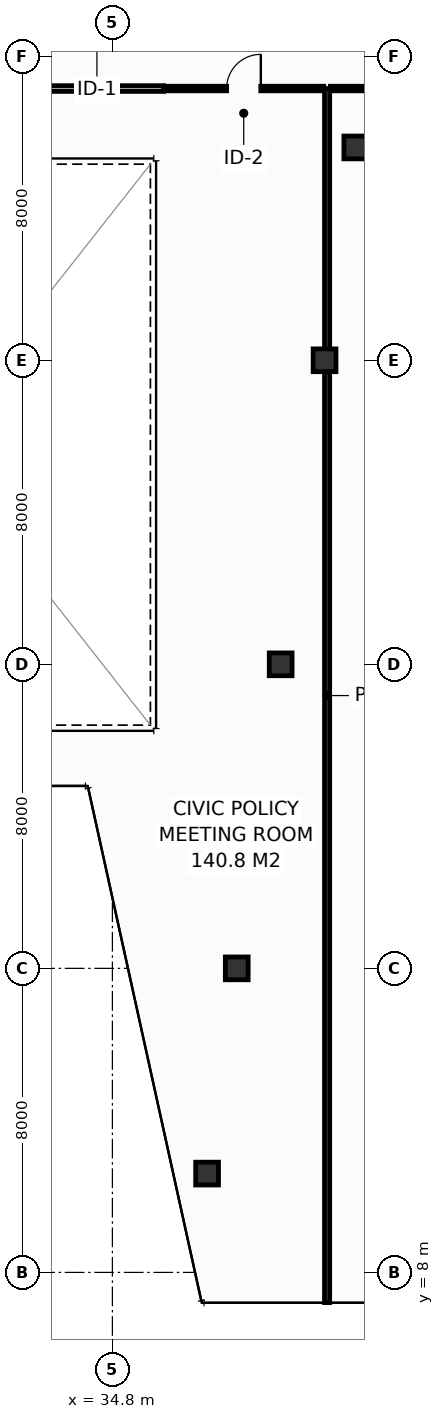
"""IFC4 building model, lengths in metres.
Left out: names, types, materials, properties, quantities, classifications, styles, units other than length and angle.
Written with IfcOpenShell. Run it as: python <this file> out.ifc"""

import sys

from ifc_helpers import new_model, si_unit, direction, frame, frame_2d, origin, origin_2d, place, context, subcontext, project, spatial, rectangle, hollow_rectangle, extrude, element, fill, save


model = new_model("IFC4")
c1 = context("Model", 3, precision=1e-05, world=origin(), true_north=direction((0.0, 1.0)))
c2 = subcontext(c1, "Body", "Model", "MODEL_VIEW")
j1 = project(units=[si_unit("LENGTHUNIT", "METRE"), si_unit("PLANEANGLEUNIT", "RADIAN")], contexts=[c1])
p1 = place(None, origin())
s1 = spatial("IfcSite", under=j1, at=p1, CompositionType="ELEMENT")
p2 = place(p1, origin())
s2 = spatial("IfcBuilding", under=s1, at=p2, CompositionType="ELEMENT")
p3 = place(p2, frame((0.0, 0.0, 144.8)))
s3 = spatial("IfcBuildingStorey", under=s2, at=p3, CompositionType="ELEMENT", Elevation=144.8)
for number, where, z_axis, x_axis in (
    (1, (37.292, 10.6, 0.0), (0.0, 0.0, 1.0), (1.0, 0.0, 0.0)),
    (2, (38.072, 16.0, 0.0), (0.0, 0.0, 1.0), (1.0, 0.0, 0.0)),
    (3, (39.228, 24.0, 0.0), (0.0, 0.0, 1.0), (1.0, 0.0, 0.0)),
    (4, (40.383, 32.0, 0.0), (0.0, 0.0, 1.0), (1.0, 0.0, 0.0)),
    (5, (41.192, 37.6, 0.0), (0.0, 0.0, 1.0), (1.0, 0.0, 0.0)),
):
    element("IfcColumn", number, at=place(p3, frame(where, z_axis=z_axis, x_axis=x_axis)), inside=s3, PredefinedType="COLUMN", context=c2, shape_type="SweptSolid", body=[
        extrude(hollow_rectangle(XDim=0.6, YDim=0.6, WallThickness=0.028, at=origin_2d()), origin(), (0.0, 0.0, 1.0), 3.8),
    ])
p4 = place(p3, frame((40.45, 7.205, 0.0), z_axis=(0.0, 0.0, 1.0), x_axis=(0.0, 1.0, 0.0)))
e6 = element("IfcWall", 6, at=p4, inside=s3, PredefinedType="PARTITIONING", context=c2, shape_type="SweptSolid", body=[
    extrude(rectangle(XDim=31.945, YDim=0.135, at=frame_2d((15.972, 0.0))), origin(), (0.0, 0.0, 1.0), 2.835),
])
p5 = place(p3, frame((23.85, 39.15, 0.0), z_axis=(0.0, 0.0, 1.0), x_axis=(1.0, 0.0, 0.0)))
e7 = element("IfcWall", 7, at=p5, inside=s3, PredefinedType="PARTITIONING", context=c2, shape_type="SweptSolid", body=[
    extrude(rectangle(XDim=12.3, YDim=0.15, at=frame_2d((6.15, 0.0))), origin(), (0.0, 0.0, 1.0), 3.55),
])
p6 = place(p3, frame((36.15, 39.15, 0.0), z_axis=(0.0, 0.0, 1.0), x_axis=(1.0, 0.0, 0.0)))
e8 = element("IfcWall", 8, at=p6, inside=s3, PredefinedType="PARTITIONING", context=c2, shape_type="SweptSolid", body=[
    extrude(rectangle(XDim=4.213, YDim=0.12, at=frame_2d((2.106, 0.0))), origin(), (0.0, 0.0, 1.0), 2.835),
])
p7 = place(p6, frame((1.656, 0.0, 0.0)))
e9 = element("IfcOpeningElement", 9, at=p7, cuts=e8, PredefinedType="OPENING", context=c2, shape_type="SweptSolid", body=[
    extrude(rectangle(XDim=0.9, YDim=2.1, at=frame_2d((0.45, 1.05))), frame((0.0, 0.07, 0.0), z_axis=(0.0, -1.0, 0.0), x_axis=(1.0, 0.0, 0.0)), (0.0, 0.0, 1.0), 0.14),
])
p8 = place(p3, frame((40.538, 39.15, 0.0), z_axis=(0.0, 0.0, 1.0), x_axis=(1.0, 0.0, 0.0)))
e10 = element("IfcWall", 10, at=p8, inside=s3, PredefinedType="PARTITIONING", context=c2, shape_type="SweptSolid", body=[
    extrude(rectangle(XDim=4.135, YDim=0.12, at=frame_2d((2.067, 0.0))), origin(), (0.0, 0.0, 1.0), 3.55),
])
p9 = place(p8, frame((1.617, 0.0, 0.0)))
e11 = element("IfcOpeningElement", 11, at=p9, cuts=e10, PredefinedType="OPENING", context=c2, shape_type="SweptSolid", body=[
    extrude(rectangle(XDim=0.9, YDim=2.1, at=frame_2d((0.45, 1.05))), frame((0.0, 0.07, 0.0), z_axis=(0.0, -1.0, 0.0), x_axis=(1.0, 0.0, 0.0)), (0.0, 0.0, 1.0), 0.14),
])
p10 = place(p7, origin())
e12 = element("IfcDoor", 12, at=p10, inside=s3, OperationType="SINGLE_SWING_RIGHT", PredefinedType="DOOR", context=c2, shape_type="SweptSolid", body=[
    extrude(rectangle(XDim=0.9, YDim=2.1, at=frame_2d((0.45, 1.05))), frame((0.0, 0.025, 0.0), z_axis=(0.0, -1.0, 0.0), x_axis=(1.0, 0.0, 0.0)), (0.0, 0.0, 1.0), 0.05),
])
fill(e9, e12)
save(model, sys.argv[1])
